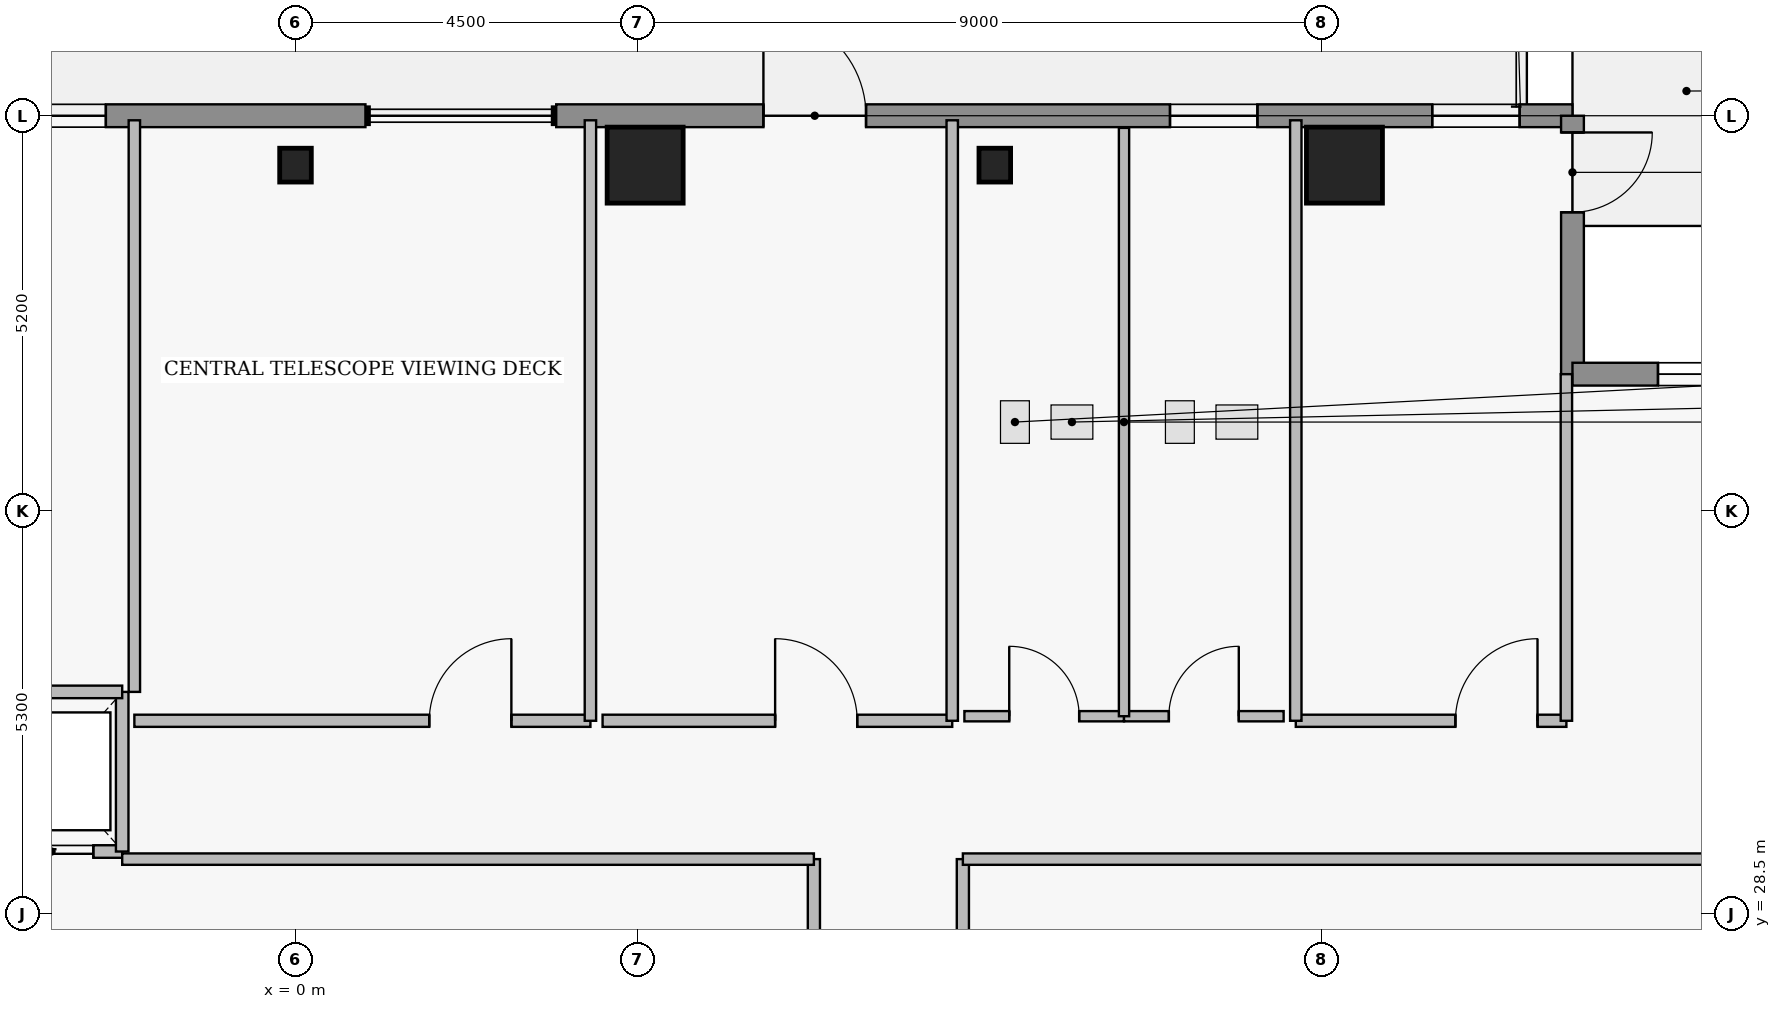
"""IFC4 building model, lengths in metres.
Left out: names, types, materials, properties, quantities, classifications, styles, units other than length and angle.
Written with IfcOpenShell. Run it as: python <this file> out.ifc"""

import sys

from ifc_helpers import new_model, si_unit, direction, frame, frame_2d, origin, origin_2d, place, context, subcontext, project, spatial, rectangle, i_section, extrude, element, fill, save


model = new_model("IFC4")
c1 = context("Model", 3, precision=1e-05, world=origin(), true_north=direction((0.0, 1.0)))
c2 = subcontext(c1, "Body", "Model", "MODEL_VIEW")
j1 = project(units=[si_unit("LENGTHUNIT", "METRE"), si_unit("PLANEANGLEUNIT", "RADIAN")], contexts=[c1])
p1 = place(None, origin())
s1 = spatial("IfcSite", under=j1, at=p1, CompositionType="ELEMENT")
p2 = place(p1, origin())
s2 = spatial("IfcBuilding", under=s1, at=p2, CompositionType="ELEMENT")
p3 = place(p2, frame((0.0, 0.0, 292.85)))
s3 = spatial("IfcBuildingStorey", under=s2, at=p3, CompositionType="ELEMENT", Elevation=292.85)
for number, where, z_axis, x_axis in (
    (1, (4.6, 38.35, 0.0), (0.0, 0.0, 1.0), (1.0, 0.0, 0.0)),
    (2, (13.8, 38.35, 0.0), (0.0, 0.0, 1.0), (1.0, 0.0, 0.0)),
):
    element("IfcColumn", number, at=place(p3, frame(where, z_axis=z_axis, x_axis=x_axis)), inside=s3, PredefinedType="COLUMN", context=c2, shape_type="SweptSolid", body=[
        extrude(rectangle(XDim=1.0, YDim=1.0, at=origin_2d()), origin(), (0.0, 0.0, 1.0), 4.4),
    ])
for number, where, z_axis, x_axis in (
    (3, (0.0, 38.35, -0.22), (0.0, 0.0, 1.0), (1.0, 0.0, 0.0)),
    (4, (9.2, 38.35, -0.22), (0.0, 0.0, 1.0), (1.0, 0.0, 0.0)),
):
    element("IfcColumn", number, at=place(p3, frame(where, z_axis=z_axis, x_axis=x_axis)), inside=s3, PredefinedType="PILASTER", context=c2, shape_type="SweptSolid", body=[
        extrude(i_section(OverallWidth=0.416, OverallDepth=0.445, WebThickness=0.039, FlangeThickness=0.063, at=origin_2d()), origin(), (0.0, 0.0, 1.0), 3.48),
    ])
p4 = place(p3, frame((-5.52, 39.0, 0.0), z_axis=(0.0, 0.0, 1.0), x_axis=(1.0, 0.0, 0.0)))
e5 = element("IfcWall", 5, at=p4, inside=s3, PredefinedType="STANDARD", context=c2, shape_type="SweptSolid", body=[
    extrude(rectangle(XDim=6.44, YDim=0.3, at=frame_2d((3.22, 0.0))), origin(), (0.0, 0.0, 1.0), 4.16),
])
p5 = place(p4, frame((1.875, 0.0, 0.95)))
e6 = element("IfcOpeningElement", 6, at=p5, cuts=e5, PredefinedType="OPENING", context=c2, shape_type="SweptSolid", body=[
    extrude(rectangle(XDim=1.15, YDim=1.55, at=frame_2d((0.575, 0.775))), frame((0.0, 0.16, 0.0), z_axis=(0.0, -1.0, 0.0), x_axis=(1.0, 0.0, 0.0)), (0.0, 0.0, 1.0), 0.32),
])
p6 = place(p3, frame((3.43, 39.0, 0.0), z_axis=(0.0, 0.0, 1.0), x_axis=(1.0, 0.0, 0.0)))
e7 = element("IfcWall", 7, at=p6, inside=s3, PredefinedType="STANDARD", context=c2, shape_type="SweptSolid", body=[
    extrude(rectangle(XDim=13.37, YDim=0.3, at=frame_2d((6.685, 0.0))), origin(), (0.0, 0.0, 1.0), 4.16),
])
p7 = place(p6, frame((2.726, 0.0, 0.0)))
e8 = element("IfcOpeningElement", 8, at=p7, cuts=e7, PredefinedType="OPENING", context=c2, shape_type="SweptSolid", body=[
    extrude(rectangle(XDim=1.35, YDim=2.3, at=frame_2d((0.675, 1.15))), frame((0.0, 0.16, 0.0), z_axis=(0.0, -1.0, 0.0), x_axis=(1.0, 0.0, 0.0)), (0.0, 0.0, 1.0), 0.32),
])
p8 = place(p6, frame((8.075, 0.0, 0.95)))
e9 = element("IfcOpeningElement", 9, at=p8, cuts=e7, PredefinedType="OPENING", context=c2, shape_type="SweptSolid", body=[
    extrude(rectangle(XDim=1.15, YDim=1.55, at=frame_2d((0.575, 0.775))), frame((0.0, 0.16, 0.0), z_axis=(0.0, -1.0, 0.0), x_axis=(1.0, 0.0, 0.0)), (0.0, 0.0, 1.0), 0.32),
])
p9 = place(p6, frame((11.525, 0.0, 0.95)))
e10 = element("IfcOpeningElement", 10, at=p9, cuts=e7, PredefinedType="OPENING", context=c2, shape_type="SweptSolid", body=[
    extrude(rectangle(XDim=1.15, YDim=1.55, at=frame_2d((0.575, 0.775))), frame((0.0, 0.16, 0.0), z_axis=(0.0, -1.0, 0.0), x_axis=(1.0, 0.0, 0.0)), (0.0, 0.0, 1.0), 0.32),
])
p10 = place(p3, frame((16.8, 39.0, 0.0), z_axis=(0.0, 0.0, 1.0), x_axis=(0.0, -1.0, 0.0)))
e11 = element("IfcWall", 11, at=p10, inside=s3, PredefinedType="STANDARD", context=c2, shape_type="SweptSolid", body=[
    extrude(rectangle(XDim=3.4, YDim=0.3, at=frame_2d((1.7, 0.0))), origin(), (0.0, 0.0, 1.0), 4.16),
])
p11 = place(p10, frame((0.22, 0.0, 0.0)))
e12 = element("IfcOpeningElement", 12, at=p11, cuts=e11, PredefinedType="OPENING", context=c2, shape_type="SweptSolid", body=[
    extrude(rectangle(XDim=1.05, YDim=2.2, at=frame_2d((0.525, 1.1))), frame((0.0, 0.16, 0.0), z_axis=(0.0, -1.0, 0.0), x_axis=(1.0, 0.0, 0.0)), (0.0, 0.0, 1.0), 0.32),
])
p12 = place(p3, frame((16.8, 35.6, 0.0), z_axis=(0.0, 0.0, 1.0), x_axis=(1.0, 0.0, 0.0)))
e13 = element("IfcWall", 13, at=p12, inside=s3, PredefinedType="STANDARD", context=c2, shape_type="SweptSolid", body=[
    extrude(rectangle(XDim=3.4, YDim=0.3, at=frame_2d((1.7, 0.0))), origin(), (0.0, 0.0, 1.0), 4.16),
])
p13 = place(p12, frame((1.125, 0.0, 1.25)))
e14 = element("IfcOpeningElement", 14, at=p13, cuts=e13, PredefinedType="OPENING", context=c2, shape_type="SweptSolid", body=[
    extrude(rectangle(XDim=1.15, YDim=1.55, at=frame_2d((0.575, 0.775))), frame((0.0, 0.16, 0.0), z_axis=(0.0, -1.0, 0.0), x_axis=(1.0, 0.0, 0.0)), (0.0, 0.0, 1.0), 0.32),
])
p14 = place(p3, frame((-4.14, 29.32, 0.0), z_axis=(0.0, 0.0, 1.0), x_axis=(1.0, 0.0, 0.0)))
e15 = element("IfcWall", 15, at=p14, inside=s3, PredefinedType="PARTITIONING", context=c2, shape_type="SweptSolid", body=[
    extrude(rectangle(XDim=1.86, YDim=0.165, at=frame_2d((0.93, 0.0))), origin(), (0.0, 0.0, 1.0), 4.16),
])
p15 = place(p14, frame((0.38, 0.0, 0.0)))
e16 = element("IfcOpeningElement", 16, at=p15, cuts=e15, PredefinedType="OPENING", context=c2, shape_type="SweptSolid", body=[
    extrude(rectangle(XDim=1.1, YDim=2.25, at=frame_2d((0.55, 1.125))), frame((0.0, 0.093, 0.0), z_axis=(0.0, -1.0, 0.0), x_axis=(1.0, 0.0, 0.0)), (0.0, 0.0, 1.0), 0.185),
])
p16 = place(p3, frame((-2.12, 31.04, 0.0), z_axis=(0.0, 0.0, 1.0), x_axis=(1.0, 0.0, 0.0)))
e17 = element("IfcWall", 17, at=p16, inside=s3, PredefinedType="PARTITIONING", context=c2, shape_type="SweptSolid", body=[
    extrude(rectangle(XDim=6.0, YDim=0.16, at=frame_2d((3.0, 0.0))), origin(), (0.0, 0.0, 1.0), 4.16),
])
p17 = place(p16, frame((3.88, 0.0, 0.0)))
e18 = element("IfcOpeningElement", 18, at=p17, cuts=e17, PredefinedType="OPENING", context=c2, shape_type="SweptSolid", body=[
    extrude(rectangle(XDim=1.08, YDim=2.18, at=frame_2d((0.54, 1.09))), frame((0.0, 0.09, 0.0), z_axis=(0.0, -1.0, 0.0), x_axis=(1.0, 0.0, 0.0)), (0.0, 0.0, 1.0), 0.18),
])
p18 = place(p3, frame((4.04, 31.04, 0.0), z_axis=(0.0, 0.0, 1.0), x_axis=(1.0, 0.0, 0.0)))
e19 = element("IfcWall", 19, at=p18, inside=s3, PredefinedType="PARTITIONING", context=c2, shape_type="SweptSolid", body=[
    extrude(rectangle(XDim=4.6, YDim=0.16, at=frame_2d((2.3, 0.0))), origin(), (0.0, 0.0, 1.0), 4.16),
])
p19 = place(p18, frame((2.27, 0.0, 0.0)))
e20 = element("IfcOpeningElement", 20, at=p19, cuts=e19, PredefinedType="OPENING", context=c2, shape_type="SweptSolid", body=[
    extrude(rectangle(XDim=1.08, YDim=2.18, at=frame_2d((0.54, 1.09))), frame((0.0, 0.09, 0.0), z_axis=(0.0, -1.0, 0.0), x_axis=(1.0, 0.0, 0.0)), (0.0, 0.0, 1.0), 0.18),
])
p20 = place(p3, frame((13.16, 31.04, 0.0), z_axis=(0.0, 0.0, 1.0), x_axis=(1.0, 0.0, 0.0)))
e21 = element("IfcWall", 21, at=p20, inside=s3, PredefinedType="PARTITIONING", context=c2, shape_type="SweptSolid", body=[
    extrude(rectangle(XDim=3.56, YDim=0.16, at=frame_2d((1.78, 0.0))), origin(), (0.0, 0.0, 1.0), 4.16),
])
p21 = place(p20, frame((2.1, 0.0, 0.0)))
e22 = element("IfcOpeningElement", 22, at=p21, cuts=e21, PredefinedType="OPENING", context=c2, shape_type="SweptSolid", body=[
    extrude(rectangle(XDim=1.08, YDim=2.18, at=frame_2d((0.54, 1.09))), frame((0.0, 0.09, 0.0), z_axis=(0.0, -1.0, 0.0), x_axis=(1.0, 0.0, 0.0)), (0.0, 0.0, 1.0), 0.18),
])
p22 = place(p3, frame((6.82, 24.96, 0.0), z_axis=(0.0, 0.0, 1.0), x_axis=(0.0, 1.0, 0.0)))
e23 = element("IfcWall", 23, at=p22, inside=s3, PredefinedType="PARTITIONING", context=c2, shape_type="SweptSolid", body=[
    extrude(rectangle(XDim=4.26, YDim=0.16, at=frame_2d((2.13, 0.0))), origin(), (0.0, 0.0, 1.0), 4.16),
])
p23 = place(p22, frame((1.59, 0.0, 0.0)))
e24 = element("IfcOpeningElement", 24, at=p23, cuts=e23, PredefinedType="OPENING", context=c2, shape_type="SweptSolid", body=[
    extrude(rectangle(XDim=1.08, YDim=2.18, at=frame_2d((0.54, 1.09))), frame((0.0, 0.09, 0.0), z_axis=(0.0, -1.0, 0.0), x_axis=(1.0, 0.0, 0.0)), (0.0, 0.0, 1.0), 0.18),
])
p24 = place(p3, frame((8.78, 23.76, 0.0), z_axis=(0.0, 0.0, 1.0), x_axis=(0.0, 1.0, 0.0)))
e25 = element("IfcWall", 25, at=p24, inside=s3, PredefinedType="PARTITIONING", context=c2, shape_type="SweptSolid", body=[
    extrude(rectangle(XDim=5.46, YDim=0.16, at=frame_2d((2.73, 0.0))), origin(), (0.0, 0.0, 1.0), 4.16),
])
p25 = place(p24, frame((2.19, 0.0, 0.0)))
e26 = element("IfcOpeningElement", 26, at=p25, cuts=e25, PredefinedType="OPENING", context=c2, shape_type="SweptSolid", body=[
    extrude(rectangle(XDim=1.08, YDim=2.18, at=frame_2d((0.54, 1.09))), frame((0.0, 0.09, 0.0), z_axis=(0.0, -1.0, 0.0), x_axis=(1.0, 0.0, 0.0)), (0.0, 0.0, 1.0), 0.18),
])
p26 = place(p3, frame((8.8, 31.1, 0.0), z_axis=(0.0, 0.0, 1.0), x_axis=(1.0, 0.0, 0.0)))
e27 = element("IfcWall", 27, at=p26, inside=s3, PredefinedType="PLUMBINGWALL", context=c2, shape_type="SweptSolid", body=[
    extrude(rectangle(XDim=2.1, YDim=0.135, at=frame_2d((1.05, 0.0))), origin(), (0.0, 0.0, 1.0), 4.16),
])
p27 = place(p26, frame((0.59, 0.0, 0.0)))
e28 = element("IfcOpeningElement", 28, at=p27, cuts=e27, PredefinedType="OPENING", context=c2, shape_type="SweptSolid", body=[
    extrude(rectangle(XDim=0.92, YDim=2.12, at=frame_2d((0.46, 1.06))), frame((0.0, 0.077, 0.0), z_axis=(0.0, -1.0, 0.0), x_axis=(1.0, 0.0, 0.0)), (0.0, 0.0, 1.0), 0.155),
])
p28 = place(p3, frame((10.9, 31.1, 0.0), z_axis=(0.0, 0.0, 1.0), x_axis=(1.0, 0.0, 0.0)))
e29 = element("IfcWall", 29, at=p28, inside=s3, PredefinedType="PLUMBINGWALL", context=c2, shape_type="SweptSolid", body=[
    extrude(rectangle(XDim=2.1, YDim=0.135, at=frame_2d((1.05, 0.0))), origin(), (0.0, 0.0, 1.0), 4.16),
])
p29 = place(p28, frame((0.59, 0.0, 0.0)))
e30 = element("IfcOpeningElement", 30, at=p29, cuts=e29, PredefinedType="OPENING", context=c2, shape_type="SweptSolid", body=[
    extrude(rectangle(XDim=0.92, YDim=2.12, at=frame_2d((0.46, 1.06))), frame((0.0, 0.077, 0.0), z_axis=(0.0, -1.0, 0.0), x_axis=(1.0, 0.0, 0.0)), (0.0, 0.0, 1.0), 0.155),
])
p30 = place(p3, frame((-2.28, 29.32, 0.0), z_axis=(0.0, 0.0, 1.0), x_axis=(0.0, 1.0, 0.0)))
e31 = element("IfcWall", 31, at=p30, inside=s3, PredefinedType="PARTITIONING", context=c2, shape_type="SweptSolid", body=[
    extrude(rectangle(XDim=2.1, YDim=0.165, at=frame_2d((1.05, 0.0))), origin(), (0.0, 0.0, 1.0), 4.16),
])
p31 = place(p3, frame((-4.14, 31.42, 0.0), z_axis=(0.0, 0.0, 1.0), x_axis=(1.0, 0.0, 0.0)))
e32 = element("IfcWall", 32, at=p31, inside=s3, PredefinedType="PARTITIONING", context=c2, shape_type="SweptSolid", body=[
    extrude(rectangle(XDim=1.86, YDim=0.165, at=frame_2d((0.93, 0.0))), origin(), (0.0, 0.0, 1.0), 4.16),
])
p32 = place(p3, frame((-2.12, 31.42, 0.0), z_axis=(0.0, 0.0, 1.0), x_axis=(0.0, 1.0, 0.0)))
e33 = element("IfcWall", 33, at=p32, inside=s3, PredefinedType="PARTITIONING", context=c2, shape_type="SweptSolid", body=[
    extrude(rectangle(XDim=7.52, YDim=0.15, at=frame_2d((3.76, 0.0))), origin(), (0.0, 0.0, 1.0), 4.16),
])
for number, where, z_axis, x_axis in (
    (34, (3.88, 31.04, 0.0), (0.0, 0.0, 1.0), (0.0, 1.0, 0.0)),
    (35, (8.64, 31.04, 0.0), (0.0, 0.0, 1.0), (0.0, 1.0, 0.0)),
    (36, (13.16, 31.04, 0.0), (0.0, 0.0, 1.0), (0.0, 1.0, 0.0)),
):
    element("IfcWall", number, at=place(p3, frame(where, z_axis=z_axis, x_axis=x_axis)), inside=s3, PredefinedType="PARTITIONING", context=c2, shape_type="SweptSolid", body=[
        extrude(rectangle(XDim=7.9, YDim=0.15, at=frame_2d((3.95, 0.0))), origin(), (0.0, 0.0, 1.0), 4.16),
    ])
p33 = place(p3, frame((16.72, 31.04, 0.0), z_axis=(0.0, 0.0, 1.0), x_axis=(0.0, 1.0, 0.0)))
e37 = element("IfcWall", 37, at=p33, inside=s3, PredefinedType="PARTITIONING", context=c2, shape_type="SweptSolid", body=[
    extrude(rectangle(XDim=4.56, YDim=0.15, at=frame_2d((2.28, 0.0))), origin(), (0.0, 0.0, 1.0), 4.16),
])
p34 = place(p3, frame((-2.28, 29.22, 0.0), z_axis=(0.0, 0.0, 1.0), x_axis=(1.0, 0.0, 0.0)))
e38 = element("IfcWall", 38, at=p34, inside=s3, PredefinedType="PARTITIONING", context=c2, shape_type="SweptSolid", body=[
    extrude(rectangle(XDim=9.1, YDim=0.15, at=frame_2d((4.55, 0.0))), origin(), (0.0, 0.0, 1.0), 4.16),
])
p35 = place(p3, frame((8.78, 29.22, 0.0), z_axis=(0.0, 0.0, 1.0), x_axis=(1.0, 0.0, 0.0)))
e39 = element("IfcWall", 39, at=p35, inside=s3, PredefinedType="PARTITIONING", context=c2, shape_type="SweptSolid", body=[
    extrude(rectangle(XDim=11.36, YDim=0.15, at=frame_2d((5.68, 0.0))), origin(), (0.0, 0.0, 1.0), 4.16),
])
p36 = place(p3, frame((10.9, 31.1, 0.0), z_axis=(0.0, 0.0, 1.0), x_axis=(0.0, 1.0, 0.0)))
e40 = element("IfcWall", 40, at=p36, inside=s3, PredefinedType="PLUMBINGWALL", context=c2, shape_type="SweptSolid", body=[
    extrude(rectangle(XDim=7.74, YDim=0.135, at=frame_2d((3.87, 0.0))), origin(), (0.0, 0.0, 1.0), 4.16),
])
p37 = place(p5, origin())
e41 = element("IfcWindow", 41, at=p37, inside=s3, PartitioningType="SINGLE_PANEL", PredefinedType="WINDOW", context=c2, shape_type="SweptSolid", body=[
    extrude(rectangle(XDim=1.15, YDim=1.55, at=frame_2d((0.575, 0.775))), frame((0.0, 0.03, 0.0), z_axis=(0.0, -1.0, 0.0), x_axis=(1.0, 0.0, 0.0)), (0.0, 0.0, 1.0), 0.06),
])
fill(e6, e41)
p38 = place(p7, origin())
e42 = element("IfcDoor", 42, at=p38, inside=s3, OperationType="SINGLE_SWING_LEFT", PredefinedType="DOOR", context=c2, shape_type="SweptSolid", body=[
    extrude(rectangle(XDim=1.35, YDim=2.3, at=frame_2d((0.675, 1.15))), frame((0.0, 0.025, 0.0), z_axis=(0.0, -1.0, 0.0), x_axis=(1.0, 0.0, 0.0)), (0.0, 0.0, 1.0), 0.05),
])
fill(e8, e42)
p39 = place(p8, origin())
e43 = element("IfcWindow", 43, at=p39, inside=s3, PartitioningType="SINGLE_PANEL", PredefinedType="WINDOW", context=c2, shape_type="SweptSolid", body=[
    extrude(rectangle(XDim=1.15, YDim=1.55, at=frame_2d((0.575, 0.775))), frame((0.0, 0.03, 0.0), z_axis=(0.0, -1.0, 0.0), x_axis=(1.0, 0.0, 0.0)), (0.0, 0.0, 1.0), 0.06),
])
fill(e9, e43)
p40 = place(p9, origin())
e44 = element("IfcWindow", 44, at=p40, inside=s3, PartitioningType="SINGLE_PANEL", PredefinedType="WINDOW", context=c2, shape_type="SweptSolid", body=[
    extrude(rectangle(XDim=1.15, YDim=1.55, at=frame_2d((0.575, 0.775))), frame((0.0, 0.03, 0.0), z_axis=(0.0, -1.0, 0.0), x_axis=(1.0, 0.0, 0.0)), (0.0, 0.0, 1.0), 0.06),
])
fill(e10, e44)
p41 = place(p11, origin())
e45 = element("IfcDoor", 45, at=p41, inside=s3, OperationType="SINGLE_SWING_LEFT", PredefinedType="DOOR", context=c2, shape_type="SweptSolid", body=[
    extrude(rectangle(XDim=1.05, YDim=2.2, at=frame_2d((0.525, 1.1))), frame((0.0, 0.025, 0.0), z_axis=(0.0, -1.0, 0.0), x_axis=(1.0, 0.0, 0.0)), (0.0, 0.0, 1.0), 0.05),
])
fill(e12, e45)
p42 = place(p13, origin())
e46 = element("IfcWindow", 46, at=p42, inside=s3, PartitioningType="SINGLE_PANEL", PredefinedType="WINDOW", context=c2, shape_type="SweptSolid", body=[
    extrude(rectangle(XDim=1.15, YDim=1.55, at=frame_2d((0.575, 0.775))), frame((0.0, 0.03, 0.0), z_axis=(0.0, -1.0, 0.0), x_axis=(1.0, 0.0, 0.0)), (0.0, 0.0, 1.0), 0.06),
])
fill(e14, e46)
p43 = place(p15, origin())
e47 = element("IfcDoor", 47, at=p43, inside=s3, OperationType="SLIDING_TO_LEFT", PredefinedType="DOOR", context=c2, shape_type="SweptSolid", body=[
    extrude(rectangle(XDim=1.1, YDim=2.25, at=frame_2d((0.55, 1.125))), frame((0.0, 0.025, 0.0), z_axis=(0.0, -1.0, 0.0), x_axis=(1.0, 0.0, 0.0)), (0.0, 0.0, 1.0), 0.05),
])
fill(e16, e47)
p44 = place(p17, origin())
e48 = element("IfcDoor", 48, at=p44, inside=s3, OperationType="SINGLE_SWING_RIGHT", PredefinedType="DOOR", context=c2, shape_type="SweptSolid", body=[
    extrude(rectangle(XDim=1.08, YDim=2.18, at=frame_2d((0.54, 1.09))), frame((0.0, 0.025, 0.0), z_axis=(0.0, -1.0, 0.0), x_axis=(1.0, 0.0, 0.0)), (0.0, 0.0, 1.0), 0.05),
])
fill(e18, e48)
p45 = place(p19, origin())
e49 = element("IfcDoor", 49, at=p45, inside=s3, OperationType="SINGLE_SWING_LEFT", PredefinedType="DOOR", context=c2, shape_type="SweptSolid", body=[
    extrude(rectangle(XDim=1.08, YDim=2.18, at=frame_2d((0.54, 1.09))), frame((0.0, 0.025, 0.0), z_axis=(0.0, -1.0, 0.0), x_axis=(1.0, 0.0, 0.0)), (0.0, 0.0, 1.0), 0.05),
])
fill(e20, e49)
p46 = place(p21, origin())
e50 = element("IfcDoor", 50, at=p46, inside=s3, OperationType="SINGLE_SWING_RIGHT", PredefinedType="DOOR", context=c2, shape_type="SweptSolid", body=[
    extrude(rectangle(XDim=1.08, YDim=2.18, at=frame_2d((0.54, 1.09))), frame((0.0, 0.025, 0.0), z_axis=(0.0, -1.0, 0.0), x_axis=(1.0, 0.0, 0.0)), (0.0, 0.0, 1.0), 0.05),
])
fill(e22, e50)
p47 = place(p27, origin())
e51 = element("IfcDoor", 51, at=p47, inside=s3, OperationType="SINGLE_SWING_LEFT", PredefinedType="DOOR", context=c2, shape_type="SweptSolid", body=[
    extrude(rectangle(XDim=0.92, YDim=2.12, at=frame_2d((0.46, 1.06))), frame((0.0, 0.025, 0.0), z_axis=(0.0, -1.0, 0.0), x_axis=(1.0, 0.0, 0.0)), (0.0, 0.0, 1.0), 0.05),
])
fill(e28, e51)
p48 = place(p29, origin())
e52 = element("IfcDoor", 52, at=p48, inside=s3, OperationType="SINGLE_SWING_RIGHT", PredefinedType="DOOR", context=c2, shape_type="SweptSolid", body=[
    extrude(rectangle(XDim=0.92, YDim=2.12, at=frame_2d((0.46, 1.06))), frame((0.0, 0.025, 0.0), z_axis=(0.0, -1.0, 0.0), x_axis=(1.0, 0.0, 0.0)), (0.0, 0.0, 1.0), 0.05),
])
fill(e30, e52)
save(model, sys.argv[1])
